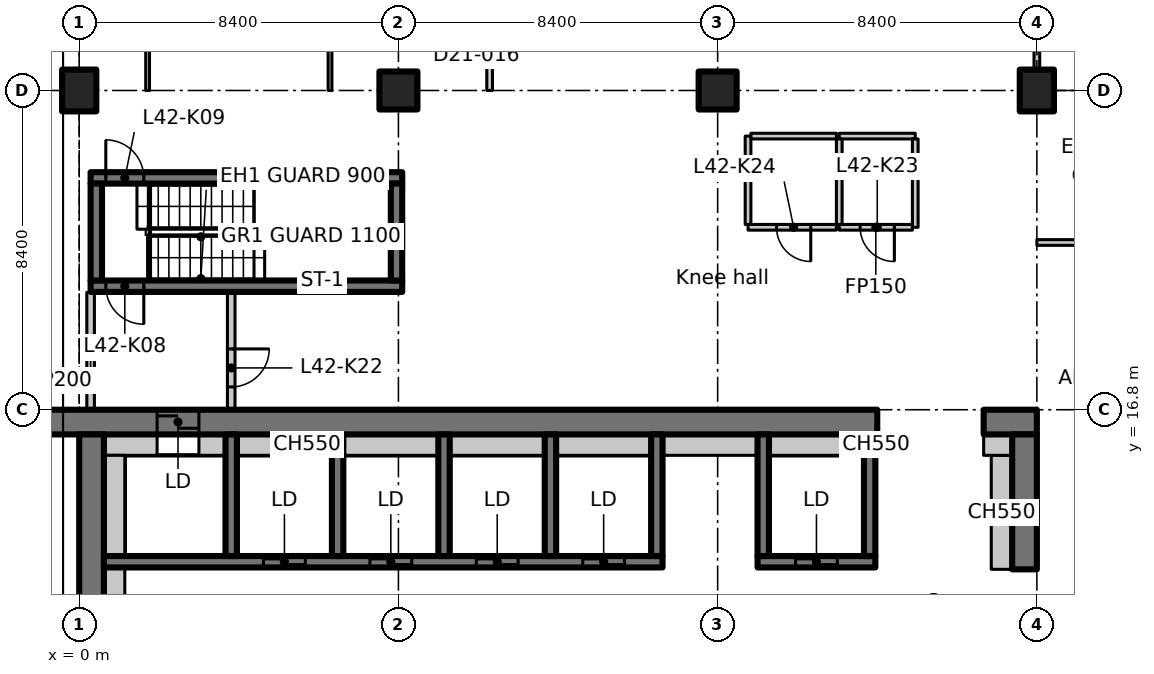
"""IFC4 building model, lengths in metres.
Left out: names, types, materials, properties, quantities, classifications, styles, units other than length and angle.
Written with IfcOpenShell. Run it as: python <this file> out.ifc"""

import sys

from ifc_helpers import new_model, si_unit, direction, frame, frame_2d, origin, origin_2d, place, context, subcontext, project, spatial, polyline, rectangle, outline, extrude, element, fill, save


model = new_model("IFC4")
c1 = context("Model", 3, precision=1e-05, world=origin(), true_north=direction((0.0, 1.0)))
c2 = subcontext(c1, "Body", "Model", "MODEL_VIEW")
j1 = project(units=[si_unit("LENGTHUNIT", "METRE"), si_unit("PLANEANGLEUNIT", "RADIAN")], contexts=[c1])
p1 = place(None, origin())
s1 = spatial("IfcSite", under=j1, at=p1, CompositionType="ELEMENT")
p2 = place(p1, origin())
s2 = spatial("IfcBuilding", under=s1, at=p2, CompositionType="ELEMENT")
p3 = place(p2, frame((0.0, 0.0, 170.4)))
s3 = spatial("IfcBuildingStorey", under=s2, at=p3, CompositionType="ELEMENT", Elevation=170.4)
p4 = place(p3, frame((0.0, 25.2, 0.0), z_axis=(0.0, 0.0, 1.0), x_axis=(1.0, 0.0, 0.0)))
e1 = element("IfcColumn", 1, at=p4, inside=s3, PredefinedType="COLUMN", context=c2, shape_type="SweptSolid", body=[
    extrude(rectangle(XDim=0.9, YDim=1.1, at=origin_2d()), origin(), (0.0, 0.0, 1.0), 3.35),
])
for number, where, z_axis, x_axis in (
    (2, (8.4, 25.2, 0.0), (0.0, 0.0, 1.0), (1.0, 0.0, 0.0)),
    (3, (16.8, 25.2, 0.0), (0.0, 0.0, 1.0), (1.0, 0.0, 0.0)),
):
    element("IfcColumn", number, at=place(p3, frame(where, z_axis=z_axis, x_axis=x_axis)), inside=s3, PredefinedType="COLUMN", context=c2, shape_type="SweptSolid", body=[
        extrude(rectangle(XDim=1.0, YDim=1.0, at=origin_2d()), origin(), (0.0, 0.0, 1.0), 3.35),
    ])
p5 = place(p3, frame((25.2, 25.2, 0.0), z_axis=(0.0, 0.0, 1.0), x_axis=(1.0, 0.0, 0.0)))
e4 = element("IfcColumn", 4, at=p5, inside=s3, PredefinedType="COLUMN", context=c2, shape_type="SweptSolid", body=[
    extrude(rectangle(XDim=0.9, YDim=1.1, at=origin_2d()), origin(), (0.0, 0.0, 1.0), 3.35),
])
p6 = place(p3, frame((-1.1, 16.475, 0.0), z_axis=(0.0, 0.0, 1.0), x_axis=(1.0, 0.0, 0.0)))
e5 = element("IfcWall", 5, at=p6, inside=s3, PredefinedType="SHEAR", context=c2, shape_type="SweptSolid", body=[
    extrude(rectangle(XDim=22.1, YDim=0.65, at=frame_2d((11.05, 0.0))), origin(), (0.0, 0.0, 1.0), 3.35),
])
p7 = place(p6, frame((3.15, 0.0, 0.0)))
e6 = element("IfcOpeningElement", 6, at=p7, cuts=e5, PredefinedType="OPENING", context=c2, shape_type="SweptSolid", body=[
    extrude(rectangle(XDim=1.1, YDim=2.3, at=frame_2d((0.55, 1.15))), frame((0.0, 0.335, 0.0), z_axis=(0.0, -1.0, 0.0), x_axis=(1.0, 0.0, 0.0)), (0.0, 0.0, 1.0), 0.67),
])
p8 = place(p3, frame((23.8, 16.475, 0.0), z_axis=(0.0, 0.0, 1.0), x_axis=(1.0, 0.0, 0.0)))
e7 = element("IfcWall", 7, at=p8, inside=s3, PredefinedType="SHEAR", context=c2, shape_type="SweptSolid", body=[
    extrude(rectangle(XDim=1.4, YDim=0.65, at=frame_2d((0.7, 0.0))), origin(), (0.0, 0.0, 1.0), 3.35),
])
p9 = place(p3, frame((0.325, 7.286, 0.0), z_axis=(0.0, 0.0, 1.0), x_axis=(0.0, 1.0, 0.0)))
e8 = element("IfcWall", 8, at=p9, inside=s3, PredefinedType="SHEAR", context=c2, shape_type="SweptSolid", body=[
    extrude(rectangle(XDim=8.864, YDim=0.65, at=frame_2d((4.432, 0.0))), origin(), (0.0, 0.0, 1.0), 3.35),
])
p10 = place(p3, frame((24.875, 12.6, 0.0), z_axis=(0.0, 0.0, 1.0), x_axis=(0.0, 1.0, 0.0)))
e9 = element("IfcWall", 9, at=p10, inside=s3, PredefinedType="SHEAR", context=c2, shape_type="SweptSolid", body=[
    extrude(rectangle(XDim=3.55, YDim=0.65, at=frame_2d((1.775, 0.0))), origin(), (0.0, 0.0, 1.0), 3.35),
])
p11 = place(p3, frame((24.275, 12.6, 0.0), z_axis=(0.0, 0.0, 1.0), x_axis=(0.0, 1.0, 0.0)))
e10 = element("IfcWall", 10, at=p11, inside=s3, PredefinedType="PARTITIONING", context=c2, shape_type="SweptSolid", body=[
    extrude(rectangle(XDim=3.0, YDim=0.55, at=frame_2d((1.5, 0.0))), origin(), (0.0, 0.0, 1.0), 3.35),
])
p12 = place(p3, frame((0.65, 15.875, 0.0), z_axis=(0.0, 0.0, 1.0), x_axis=(1.0, 0.0, 0.0)))
e11 = element("IfcWall", 11, at=p12, inside=s3, PredefinedType="PARTITIONING", context=c2, shape_type="SweptSolid", body=[
    extrude(rectangle(XDim=1.4, YDim=0.55, at=frame_2d((0.7, 0.0))), origin(), (0.0, 0.0, 1.0), 3.35),
])
p13 = place(p3, frame((23.8, 15.875, 0.0), z_axis=(0.0, 0.0, 1.0), x_axis=(1.0, 0.0, 0.0)))
e12 = element("IfcWall", 12, at=p13, inside=s3, PredefinedType="PARTITIONING", context=c2, shape_type="SweptSolid", body=[
    extrude(rectangle(XDim=0.75, YDim=0.55, at=frame_2d((0.375, 0.0))), origin(), (0.0, 0.0, 1.0), 3.35),
])
p14 = place(p3, frame((0.65, 12.8, 0.0), z_axis=(0.0, 0.0, 1.0), x_axis=(1.0, 0.0, 0.0)))
e13 = element("IfcWall", 13, at=p14, inside=s3, PredefinedType="SHEAR", context=c2, shape_type="SweptSolid", body=[
    extrude(rectangle(XDim=14.7, YDim=0.3, at=frame_2d((7.35, 0.0))), origin(), (0.0, 0.0, 1.0), 3.35),
])
p15 = place(p14, frame((4.2, 0.0, 0.0)))
e14 = element("IfcOpeningElement", 14, at=p15, cuts=e13, PredefinedType="OPENING", context=c2, shape_type="SweptSolid", body=[
    extrude(rectangle(XDim=1.1, YDim=2.3, at=frame_2d((0.55, 1.15))), frame((0.0, 0.16, 0.0), z_axis=(0.0, -1.0, 0.0), x_axis=(1.0, 0.0, 0.0)), (0.0, 0.0, 1.0), 0.32),
])
p16 = place(p14, frame((7.0, 0.0, 0.0)))
e15 = element("IfcOpeningElement", 15, at=p16, cuts=e13, PredefinedType="OPENING", context=c2, shape_type="SweptSolid", body=[
    extrude(rectangle(XDim=1.1, YDim=2.3, at=frame_2d((0.55, 1.15))), frame((0.0, 0.16, 0.0), z_axis=(0.0, -1.0, 0.0), x_axis=(1.0, 0.0, 0.0)), (0.0, 0.0, 1.0), 0.32),
])
p17 = place(p14, frame((9.8, 0.0, 0.0)))
e16 = element("IfcOpeningElement", 16, at=p17, cuts=e13, PredefinedType="OPENING", context=c2, shape_type="SweptSolid", body=[
    extrude(rectangle(XDim=1.1, YDim=2.3, at=frame_2d((0.55, 1.15))), frame((0.0, 0.16, 0.0), z_axis=(0.0, -1.0, 0.0), x_axis=(1.0, 0.0, 0.0)), (0.0, 0.0, 1.0), 0.32),
])
p18 = place(p14, frame((12.6, 0.0, 0.0)))
e17 = element("IfcOpeningElement", 17, at=p18, cuts=e13, PredefinedType="OPENING", context=c2, shape_type="SweptSolid", body=[
    extrude(rectangle(XDim=1.1, YDim=2.3, at=frame_2d((0.55, 1.15))), frame((0.0, 0.16, 0.0), z_axis=(0.0, -1.0, 0.0), x_axis=(1.0, 0.0, 0.0)), (0.0, 0.0, 1.0), 0.32),
])
for number, where, z_axis, x_axis in (
    (18, (4.0, 12.95, 0.0), (0.0, 0.0, 1.0), (0.0, 1.0, 0.0)),
    (19, (6.8, 12.95, 0.0), (0.0, 0.0, 1.0), (0.0, 1.0, 0.0)),
    (20, (9.6, 12.95, 0.0), (0.0, 0.0, 1.0), (0.0, 1.0, 0.0)),
    (21, (12.4, 12.95, 0.0), (0.0, 0.0, 1.0), (0.0, 1.0, 0.0)),
    (22, (15.2, 12.95, 0.0), (0.0, 0.0, 1.0), (0.0, 1.0, 0.0)),
):
    element("IfcWall", number, at=place(p3, frame(where, z_axis=z_axis, x_axis=x_axis)), inside=s3, PredefinedType="SHEAR", context=c2, shape_type="SweptSolid", body=[
        extrude(rectangle(XDim=3.2, YDim=0.3, at=frame_2d((1.6, 0.0))), origin(), (0.0, 0.0, 1.0), 3.35),
    ])
p19 = place(p3, frame((17.85, 12.8, 0.0), z_axis=(0.0, 0.0, 1.0), x_axis=(1.0, 0.0, 0.0)))
e23 = element("IfcWall", 23, at=p19, inside=s3, PredefinedType="SHEAR", context=c2, shape_type="SweptSolid", body=[
    extrude(rectangle(XDim=3.1, YDim=0.3, at=frame_2d((1.55, 0.0))), origin(), (0.0, 0.0, 1.0), 3.35),
])
p20 = place(p19, frame((1.0, 0.0, 0.0)))
e24 = element("IfcOpeningElement", 24, at=p20, cuts=e23, PredefinedType="OPENING", context=c2, shape_type="SweptSolid", body=[
    extrude(rectangle(XDim=1.1, YDim=2.3, at=frame_2d((0.55, 1.15))), frame((0.0, 0.16, 0.0), z_axis=(0.0, -1.0, 0.0), x_axis=(1.0, 0.0, 0.0)), (0.0, 0.0, 1.0), 0.32),
])
for number, where, z_axis, x_axis in (
    (25, (18.0, 12.95, 0.0), (0.0, 0.0, 1.0), (0.0, 1.0, 0.0)),
    (26, (20.8, 12.95, 0.0), (0.0, 0.0, 1.0), (0.0, 1.0, 0.0)),
):
    element("IfcWall", number, at=place(p3, frame(where, z_axis=z_axis, x_axis=x_axis)), inside=s3, PredefinedType="SHEAR", context=c2, shape_type="SweptSolid", body=[
        extrude(rectangle(XDim=3.2, YDim=0.3, at=frame_2d((1.6, 0.0))), origin(), (0.0, 0.0, 1.0), 3.35),
    ])
p21 = place(p3, frame((8.5, 20.05, 0.0), z_axis=(0.0, 0.0, 1.0), x_axis=(-1.0, 0.0, 0.0)))
e27 = element("IfcWall", 27, at=p21, inside=s3, PredefinedType="SHEAR", context=c2, shape_type="SweptSolid", body=[
    extrude(rectangle(XDim=8.2, YDim=0.3, at=frame_2d((4.1, 0.0))), origin(), (0.0, 0.0, 1.0), 3.35),
])
p22 = place(p21, frame((6.8, 0.0, 0.0)))
e28 = element("IfcOpeningElement", 28, at=p22, cuts=e27, PredefinedType="OPENING", context=c2, shape_type="SweptSolid", body=[
    extrude(rectangle(XDim=1.0, YDim=2.1, at=frame_2d((0.5, 1.05))), frame((0.0, 0.16, 0.0), z_axis=(0.0, -1.0, 0.0), x_axis=(1.0, 0.0, 0.0)), (0.0, 0.0, 1.0), 0.32),
])
p23 = place(p3, frame((0.3, 22.9, 0.0), z_axis=(0.0, 0.0, 1.0), x_axis=(1.0, 0.0, 0.0)))
e29 = element("IfcWall", 29, at=p23, inside=s3, PredefinedType="SHEAR", context=c2, shape_type="SweptSolid", body=[
    extrude(rectangle(XDim=8.2, YDim=0.3, at=frame_2d((4.1, 0.0))), origin(), (0.0, 0.0, 1.0), 3.35),
])
p24 = place(p23, frame((0.4, 0.0, 0.0)))
e30 = element("IfcOpeningElement", 30, at=p24, cuts=e29, PredefinedType="OPENING", context=c2, shape_type="SweptSolid", body=[
    extrude(rectangle(XDim=1.0, YDim=2.1, at=frame_2d((0.5, 1.05))), frame((0.0, 0.16, 0.0), z_axis=(0.0, -1.0, 0.0), x_axis=(1.0, 0.0, 0.0)), (0.0, 0.0, 1.0), 0.32),
])
for number, where, z_axis, x_axis in (
    (31, (0.45, 20.2, 0.0), (0.0, 0.0, 1.0), (0.0, 1.0, 0.0)),
    (32, (8.35, 20.2, 0.0), (0.0, 0.0, 1.0), (0.0, 1.0, 0.0)),
):
    element("IfcWall", number, at=place(p3, frame(where, z_axis=z_axis, x_axis=x_axis)), inside=s3, PredefinedType="SHEAR", context=c2, shape_type="SweptSolid", body=[
        extrude(rectangle(XDim=2.55, YDim=0.3, at=frame_2d((1.275, 0.0))), origin(), (0.0, 0.0, 1.0), 3.35),
    ])
p25 = place(p3, frame((0.3, 16.812, 0.0), z_axis=(0.0, 0.0, 1.0), x_axis=(0.0, 1.0, 0.0)))
e33 = element("IfcWall", 33, at=p25, inside=s3, PredefinedType="PARTITIONING", context=c2, shape_type="SweptSolid", body=[
    extrude(rectangle(XDim=3.076, YDim=0.2, at=frame_2d((1.538, 0.0))), origin(), (0.0, 0.0, 1.0), 2.98),
])
p26 = place(p3, frame((4.0, 19.888, 0.0), z_axis=(0.0, 0.0, 1.0), x_axis=(0.0, -1.0, 0.0)))
e34 = element("IfcWall", 34, at=p26, inside=s3, PredefinedType="PARTITIONING", context=c2, shape_type="SweptSolid", body=[
    extrude(rectangle(XDim=3.076, YDim=0.2, at=frame_2d((1.538, 0.0))), origin(), (0.0, 0.0, 1.0), 3.35),
])
p27 = place(p26, frame((1.488, 0.0, 0.0)))
e35 = element("IfcOpeningElement", 35, at=p27, cuts=e34, PredefinedType="OPENING", context=c2, shape_type="SweptSolid", body=[
    extrude(rectangle(XDim=1.0, YDim=2.1, at=frame_2d((0.5, 1.05))), frame((0.0, 0.11, 0.0), z_axis=(0.0, -1.0, 0.0), x_axis=(1.0, 0.0, 0.0)), (0.0, 0.0, 1.0), 0.22),
])
p28 = place(p3, frame((20.0, 24.0, 0.0), z_axis=(0.0, 0.0, 1.0), x_axis=(1.0, 0.0, 0.0)))
e36 = element("IfcWall", 36, at=p28, inside=s3, PredefinedType="PARTITIONING", context=c2, shape_type="SweptSolid", body=[
    extrude(rectangle(XDim=2.0, YDim=0.15, at=frame_2d((1.0, 0.0))), origin(), (0.0, 0.0, 1.0), 3.35),
])
p29 = place(p3, frame((22.0, 23.925, 0.0), z_axis=(0.0, 0.0, 1.0), x_axis=(0.0, -1.0, 0.0)))
e37 = element("IfcWall", 37, at=p29, inside=s3, PredefinedType="PARTITIONING", context=c2, shape_type="SweptSolid", body=[
    extrude(rectangle(XDim=2.325, YDim=0.15, at=frame_2d((1.163, 0.0))), origin(), (0.0, 0.0, 1.0), 3.35),
])
p30 = place(p3, frame((21.925, 21.6, 0.0), z_axis=(0.0, 0.0, 1.0), x_axis=(-1.0, 0.0, 0.0)))
e38 = element("IfcWall", 38, at=p30, inside=s3, PredefinedType="PARTITIONING", context=c2, shape_type="SweptSolid", body=[
    extrude(rectangle(XDim=1.925, YDim=0.15, at=frame_2d((0.962, 0.0))), origin(), (0.0, 0.0, 1.0), 3.35),
])
p31 = place(p30, frame((0.475, 0.0, 0.0)))
e39 = element("IfcOpeningElement", 39, at=p31, cuts=e38, PredefinedType="OPENING", context=c2, shape_type="SweptSolid", body=[
    extrude(rectangle(XDim=0.9, YDim=2.1, at=frame_2d((0.45, 1.05))), frame((0.0, 0.085, 0.0), z_axis=(0.0, -1.0, 0.0), x_axis=(1.0, 0.0, 0.0)), (0.0, 0.0, 1.0), 0.17),
])
p32 = place(p3, frame((20.0, 21.675, 0.0), z_axis=(0.0, 0.0, 1.0), x_axis=(0.0, 1.0, 0.0)))
e40 = element("IfcWall", 40, at=p32, inside=s3, PredefinedType="PARTITIONING", context=c2, shape_type="SweptSolid", body=[
    extrude(rectangle(XDim=2.25, YDim=0.15, at=frame_2d((1.125, 0.0))), origin(), (0.0, 0.0, 1.0), 3.35),
])
p33 = place(p3, frame((19.925, 21.6, 0.0), z_axis=(0.0, 0.0, 1.0), x_axis=(-1.0, 0.0, 0.0)))
e41 = element("IfcWall", 41, at=p33, inside=s3, PredefinedType="PARTITIONING", context=c2, shape_type="SweptSolid", body=[
    extrude(rectangle(XDim=2.325, YDim=0.15, at=frame_2d((1.163, 0.0))), origin(), (0.0, 0.0, 1.0), 3.35),
])
p34 = place(p33, frame((0.675, 0.0, 0.0)))
e42 = element("IfcOpeningElement", 42, at=p34, cuts=e41, PredefinedType="OPENING", context=c2, shape_type="SweptSolid", body=[
    extrude(rectangle(XDim=0.9, YDim=2.1, at=frame_2d((0.45, 1.05))), frame((0.0, 0.085, 0.0), z_axis=(0.0, -1.0, 0.0), x_axis=(1.0, 0.0, 0.0)), (0.0, 0.0, 1.0), 0.17),
])
p35 = place(p3, frame((17.6, 21.675, 0.0), z_axis=(0.0, 0.0, 1.0), x_axis=(0.0, 1.0, 0.0)))
e43 = element("IfcWall", 43, at=p35, inside=s3, PredefinedType="PARTITIONING", context=c2, shape_type="SweptSolid", body=[
    extrude(rectangle(XDim=2.325, YDim=0.15, at=frame_2d((1.163, 0.0))), origin(), (0.0, 0.0, 1.0), 3.35),
])
p36 = place(p3, frame((17.675, 24.0, 0.0), z_axis=(0.0, 0.0, 1.0), x_axis=(1.0, 0.0, 0.0)))
e44 = element("IfcWall", 44, at=p36, inside=s3, PredefinedType="PARTITIONING", context=c2, shape_type="SweptSolid", body=[
    extrude(rectangle(XDim=2.25, YDim=0.15, at=frame_2d((1.125, 0.0))), origin(), (0.0, 0.0, 1.0), 3.35),
])
p37 = place(p3, frame((0.925, 7.286, 0.0), z_axis=(0.0, 0.0, 1.0), x_axis=(0.0, 1.0, 0.0)))
e45 = element("IfcWall", 45, at=p37, inside=s3, PredefinedType="PARTITIONING", context=c2, shape_type="SweptSolid", body=[
    extrude(rectangle(XDim=5.364, YDim=0.55, at=frame_2d((2.682, 0.0))), origin(), (0.0, 0.0, 1.0), 3.35),
])
p38 = place(p3, frame((0.925, 12.95, 0.0), z_axis=(0.0, 0.0, 1.0), x_axis=(0.0, 1.0, 0.0)))
e46 = element("IfcWall", 46, at=p38, inside=s3, PredefinedType="PARTITIONING", context=c2, shape_type="SweptSolid", body=[
    extrude(rectangle(XDim=2.65, YDim=0.55, at=frame_2d((1.325, 0.0))), origin(), (0.0, 0.0, 1.0), 3.35),
])
p39 = place(p3, frame((3.15, 15.875, 0.0), z_axis=(0.0, 0.0, 1.0), x_axis=(1.0, 0.0, 0.0)))
e47 = element("IfcWall", 47, at=p39, inside=s3, PredefinedType="PARTITIONING", context=c2, shape_type="SweptSolid", body=[
    extrude(rectangle(XDim=0.7, YDim=0.55, at=frame_2d((0.35, 0.0))), origin(), (0.0, 0.0, 1.0), 3.35),
])
for number, where, z_axis, x_axis in (
    (48, (4.15, 15.875, 0.0), (0.0, 0.0, 1.0), (1.0, 0.0, 0.0)),
    (49, (6.95, 15.875, 0.0), (0.0, 0.0, 1.0), (1.0, 0.0, 0.0)),
    (50, (9.75, 15.875, 0.0), (0.0, 0.0, 1.0), (1.0, 0.0, 0.0)),
    (51, (12.55, 15.875, 0.0), (0.0, 0.0, 1.0), (1.0, 0.0, 0.0)),
    (52, (15.35, 15.875, 0.0), (0.0, 0.0, 1.0), (1.0, 0.0, 0.0)),
    (53, (18.15, 15.875, 0.0), (0.0, 0.0, 1.0), (1.0, 0.0, 0.0)),
):
    element("IfcWall", number, at=place(p3, frame(where, z_axis=z_axis, x_axis=x_axis)), inside=s3, PredefinedType="PARTITIONING", context=c2, shape_type="SweptSolid", body=[
        extrude(rectangle(XDim=2.5, YDim=0.55, at=frame_2d((1.25, 0.0))), origin(), (0.0, 0.0, 1.0), 3.35),
    ])
p40 = place(p3, frame((20.95, 15.875, 0.0), z_axis=(0.0, 0.0, 1.0), x_axis=(1.0, 0.0, 0.0)))
e54 = element("IfcWall", 54, at=p40, inside=s3, PredefinedType="PARTITIONING", context=c2, shape_type="SweptSolid", body=[
    extrude(rectangle(XDim=0.05, YDim=0.55, at=frame_2d((0.025, 0.0))), origin(), (0.0, 0.0, 1.0), 3.35),
])
p41 = place(p3, frame((25.2, 21.2, 0.0), z_axis=(0.0, 0.0, 1.0), x_axis=(1.0, 0.0, 0.0)))
e55 = element("IfcWall", 55, at=p41, inside=s3, PredefinedType="PARTITIONING", context=c2, shape_type="SweptSolid", body=[
    extrude(rectangle(XDim=4.2, YDim=0.15, at=frame_2d((2.1, 0.0))), origin(), (0.0, 0.0, 1.0), 3.33),
])
p42 = place(p3, frame((25.2, 31.0, 0.0), z_axis=(0.0, 0.0, 1.0), x_axis=(0.0, -1.0, 0.0)))
e56 = element("IfcWall", 56, at=p42, inside=s3, PredefinedType="PARTITIONING", context=c2, shape_type="SweptSolid", body=[
    extrude(outline(polyline([(0.0, 0.0), (5.23, 0.0), (5.23, 2.98), (0.0, 2.98), (0.0, 0.0)])), frame((0.0, 0.075, 0.0), z_axis=(0.0, -1.0, 0.0), x_axis=(1.0, 0.0, 0.0)), (0.0, 0.0, 1.0), 0.15),
])
p43 = place(p42, frame((2.03, 0.0, 0.0)))
e57 = element("IfcOpeningElement", 57, at=p43, cuts=e56, PredefinedType="OPENING", context=c2, shape_type="SweptSolid", body=[
    extrude(rectangle(XDim=1.1, YDim=2.1, at=frame_2d((0.55, 1.05))), frame((0.0, 0.085, 0.0), z_axis=(0.0, -1.0, 0.0), x_axis=(1.0, 0.0, 0.0)), (0.0, 0.0, 1.0), 0.17),
])
p44 = place(p3, frame((10.8, 25.2, 0.0), z_axis=(0.0, 0.0, 1.0), x_axis=(0.0, 1.0, 0.0)))
e58 = element("IfcWall", 58, at=p44, inside=s3, PredefinedType="PARTITIONING", context=c2, shape_type="SweptSolid", body=[
    extrude(rectangle(XDim=4.2, YDim=0.15, at=frame_2d((2.1, 0.0))), origin(), (0.0, 0.0, 1.0), 3.33),
])
for number, where, z_axis, x_axis in (
    (59, (1.8, 29.4, 0.0), (0.0, 0.0, 1.0), (0.0, -1.0, 0.0)),
    (60, (6.6, 29.4, 0.0), (0.0, 0.0, 1.0), (0.0, -1.0, 0.0)),
):
    element("IfcWall", number, at=place(p3, frame(where, z_axis=z_axis, x_axis=x_axis)), inside=s3, PredefinedType="PARTITIONING", context=c2, shape_type="SweptSolid", body=[
        extrude(rectangle(XDim=4.2, YDim=0.1, at=frame_2d((2.1, 0.0))), origin(), (0.0, 0.0, 1.0), 3.33),
    ])
p45 = place(p7, origin())
e61 = element("IfcDoor", 61, at=p45, inside=s3, OperationType="SLIDING_TO_LEFT", PredefinedType="DOOR", context=c2, shape_type="SweptSolid", body=[
    extrude(rectangle(XDim=1.1, YDim=2.3, at=frame_2d((0.55, 1.15))), frame((0.0, 0.025, 0.0), z_axis=(0.0, -1.0, 0.0), x_axis=(1.0, 0.0, 0.0)), (0.0, 0.0, 1.0), 0.05),
])
fill(e6, e61)
p46 = place(p15, origin())
e62 = element("IfcDoor", 62, at=p46, inside=s3, OperationType="SLIDING_TO_LEFT", PredefinedType="DOOR", context=c2, shape_type="SweptSolid", body=[
    extrude(rectangle(XDim=1.1, YDim=2.3, at=frame_2d((0.55, 1.15))), frame((0.0, 0.025, 0.0), z_axis=(0.0, -1.0, 0.0), x_axis=(1.0, 0.0, 0.0)), (0.0, 0.0, 1.0), 0.05),
])
fill(e14, e62)
p47 = place(p16, origin())
e63 = element("IfcDoor", 63, at=p47, inside=s3, OperationType="SLIDING_TO_LEFT", PredefinedType="DOOR", context=c2, shape_type="SweptSolid", body=[
    extrude(rectangle(XDim=1.1, YDim=2.3, at=frame_2d((0.55, 1.15))), frame((0.0, 0.025, 0.0), z_axis=(0.0, -1.0, 0.0), x_axis=(1.0, 0.0, 0.0)), (0.0, 0.0, 1.0), 0.05),
])
fill(e15, e63)
p48 = place(p17, origin())
e64 = element("IfcDoor", 64, at=p48, inside=s3, OperationType="SLIDING_TO_LEFT", PredefinedType="DOOR", context=c2, shape_type="SweptSolid", body=[
    extrude(rectangle(XDim=1.1, YDim=2.3, at=frame_2d((0.55, 1.15))), frame((0.0, 0.025, 0.0), z_axis=(0.0, -1.0, 0.0), x_axis=(1.0, 0.0, 0.0)), (0.0, 0.0, 1.0), 0.05),
])
fill(e16, e64)
p49 = place(p18, origin())
e65 = element("IfcDoor", 65, at=p49, inside=s3, OperationType="SLIDING_TO_LEFT", PredefinedType="DOOR", context=c2, shape_type="SweptSolid", body=[
    extrude(rectangle(XDim=1.1, YDim=2.3, at=frame_2d((0.55, 1.15))), frame((0.0, 0.025, 0.0), z_axis=(0.0, -1.0, 0.0), x_axis=(1.0, 0.0, 0.0)), (0.0, 0.0, 1.0), 0.05),
])
fill(e17, e65)
p50 = place(p20, origin())
e66 = element("IfcDoor", 66, at=p50, inside=s3, OperationType="SLIDING_TO_LEFT", PredefinedType="DOOR", context=c2, shape_type="SweptSolid", body=[
    extrude(rectangle(XDim=1.1, YDim=2.3, at=frame_2d((0.55, 1.15))), frame((0.0, 0.025, 0.0), z_axis=(0.0, -1.0, 0.0), x_axis=(1.0, 0.0, 0.0)), (0.0, 0.0, 1.0), 0.05),
])
fill(e24, e66)
p51 = place(p22, origin())
e67 = element("IfcDoor", 67, at=p51, inside=s3, OperationType="SINGLE_SWING_LEFT", PredefinedType="DOOR", context=c2, shape_type="SweptSolid", body=[
    extrude(rectangle(XDim=1.0, YDim=2.1, at=frame_2d((0.5, 1.05))), frame((0.0, 0.025, 0.0), z_axis=(0.0, -1.0, 0.0), x_axis=(1.0, 0.0, 0.0)), (0.0, 0.0, 1.0), 0.05),
])
fill(e28, e67)
p52 = place(p24, origin())
e68 = element("IfcDoor", 68, at=p52, inside=s3, OperationType="SINGLE_SWING_RIGHT", PredefinedType="DOOR", context=c2, shape_type="SweptSolid", body=[
    extrude(rectangle(XDim=1.0, YDim=2.1, at=frame_2d((0.5, 1.05))), frame((0.0, 0.025, 0.0), z_axis=(0.0, -1.0, 0.0), x_axis=(1.0, 0.0, 0.0)), (0.0, 0.0, 1.0), 0.05),
])
fill(e30, e68)
p53 = place(p27, origin())
e69 = element("IfcDoor", 69, at=p53, inside=s3, OperationType="SINGLE_SWING_LEFT", PredefinedType="DOOR", context=c2, shape_type="SweptSolid", body=[
    extrude(rectangle(XDim=1.0, YDim=2.1, at=frame_2d((0.5, 1.05))), frame((0.0, 0.025, 0.0), z_axis=(0.0, -1.0, 0.0), x_axis=(1.0, 0.0, 0.0)), (0.0, 0.0, 1.0), 0.05),
])
fill(e35, e69)
p54 = place(p31, origin())
e70 = element("IfcDoor", 70, at=p54, inside=s3, OperationType="SINGLE_SWING_RIGHT", PredefinedType="DOOR", context=c2, shape_type="SweptSolid", body=[
    extrude(rectangle(XDim=0.9, YDim=2.1, at=frame_2d((0.45, 1.05))), frame((0.0, 0.025, 0.0), z_axis=(0.0, -1.0, 0.0), x_axis=(1.0, 0.0, 0.0)), (0.0, 0.0, 1.0), 0.05),
])
fill(e39, e70)
p55 = place(p34, origin())
e71 = element("IfcDoor", 71, at=p55, inside=s3, OperationType="SINGLE_SWING_LEFT", PredefinedType="DOOR", context=c2, shape_type="SweptSolid", body=[
    extrude(rectangle(XDim=0.9, YDim=2.1, at=frame_2d((0.45, 1.05))), frame((0.0, 0.025, 0.0), z_axis=(0.0, -1.0, 0.0), x_axis=(1.0, 0.0, 0.0)), (0.0, 0.0, 1.0), 0.05),
])
fill(e42, e71)
save(model, sys.argv[1])
